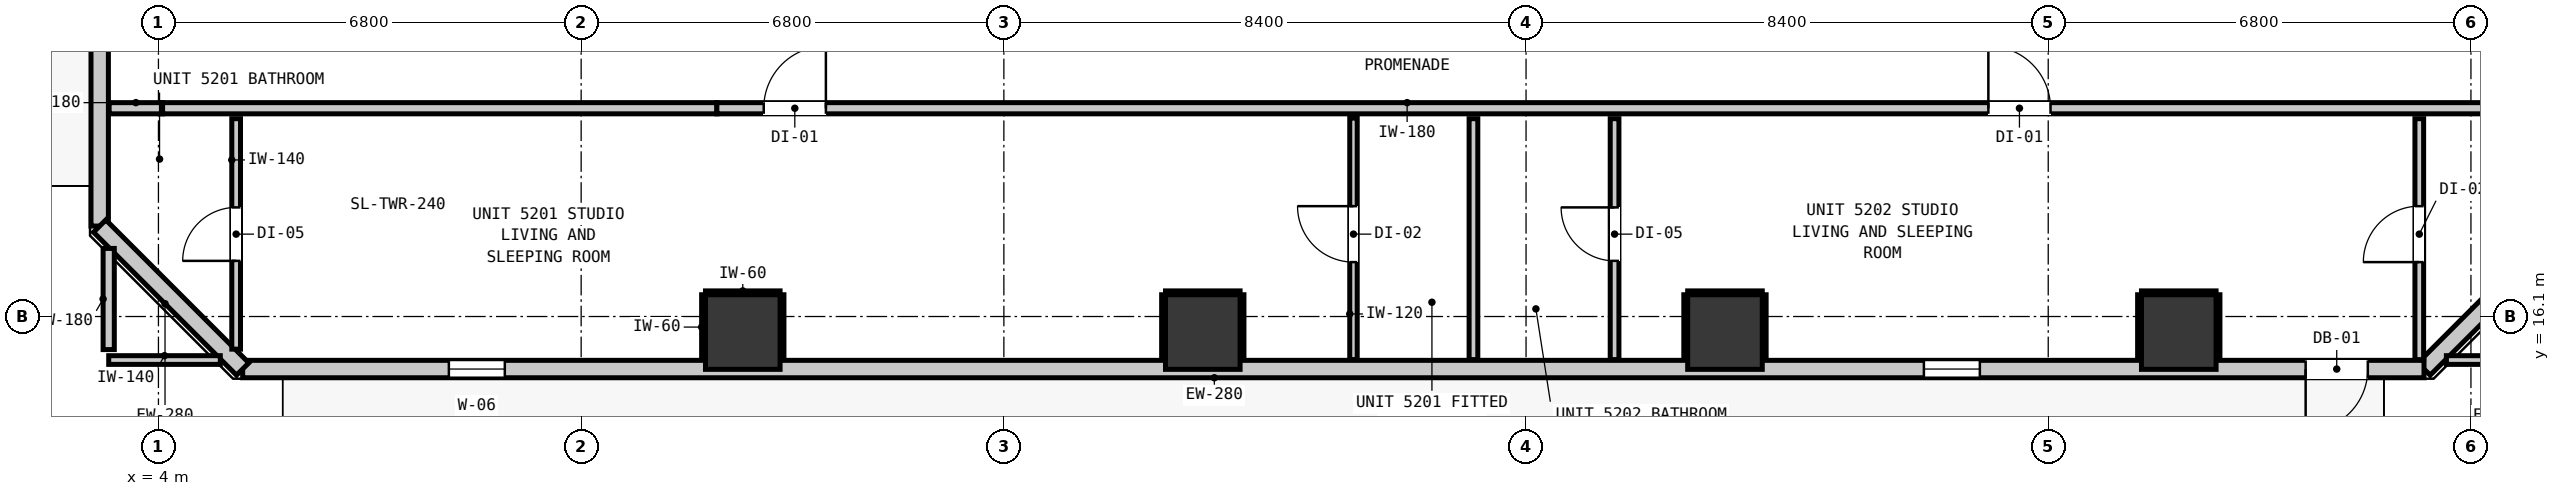
"""IFC4 building model, lengths in metres.
Left out: names, types, materials, properties, quantities, classifications, styles, units other than length and angle.
Written with IfcOpenShell. Run it as: python <this file> out.ifc"""

import sys

from ifc_helpers import new_model, si_unit, direction, frame, frame_2d, origin, origin_2d, place, context, subcontext, project, spatial, rectangle, extrude, element, fill, save


model = new_model("IFC4")
c1 = context("Model", 3, precision=1e-05, world=origin(), true_north=direction((0.0, 1.0)))
c2 = subcontext(c1, "Body", "Model", "MODEL_VIEW")
j1 = project(units=[si_unit("LENGTHUNIT", "METRE"), si_unit("PLANEANGLEUNIT", "RADIAN")], contexts=[c1])
p1 = place(None, origin())
s1 = spatial("IfcSite", under=j1, at=p1, CompositionType="ELEMENT")
p2 = place(p1, origin())
s2 = spatial("IfcBuilding", under=s1, at=p2, CompositionType="ELEMENT")
p3 = place(p2, frame((0.0, 0.0, 180.2)))
s3 = spatial("IfcBuildingStorey", under=s2, at=p3, CompositionType="ELEMENT", Elevation=180.2)
for number, where, z_axis, x_axis in (
    (1, (13.4, 15.85, 0.0), (0.0, 0.0, 1.0), (1.0, 0.0, 0.0)),
    (2, (20.8, 15.85, 0.0), (0.0, 0.0, 1.0), (1.0, 0.0, 0.0)),
    (3, (29.2, 15.85, 0.0), (0.0, 0.0, 1.0), (1.0, 0.0, 0.0)),
    (4, (36.5, 15.85, 0.0), (0.0, 0.0, 1.0), (1.0, 0.0, 0.0)),
):
    element("IfcColumn", number, at=place(p3, frame(where, z_axis=z_axis, x_axis=x_axis)), inside=s3, PredefinedType="COLUMN", context=c2, shape_type="SweptSolid", body=[
        extrude(rectangle(XDim=1.2, YDim=1.2, at=origin_2d()), origin(), (0.0, 0.0, 1.0), 3.32),
    ])
p4 = place(p3, frame((3.055, 17.555, 0.0), z_axis=(0.0, 0.0, 1.0), x_axis=(0.0, 1.0, 0.0)))
e5 = element("IfcWall", 5, at=p4, inside=s3, PredefinedType="STANDARD", context=c2, shape_type="SweptSolid", body=[
    extrude(rectangle(XDim=32.29, YDim=0.28, at=frame_2d((16.145, 0.0))), origin(), (0.0, 0.0, 1.0), 3.08),
])
p5 = place(p4, frame((8.625, 0.0, 0.0)))
e6 = element("IfcOpeningElement", 6, at=p5, cuts=e5, PredefinedType="OPENING", context=c2, shape_type="SweptSolid", body=[
    extrude(rectangle(XDim=1.0, YDim=2.15, at=frame_2d((0.5, 1.075))), frame((0.0, 0.15, 0.0), z_axis=(0.0, -1.0, 0.0), x_axis=(1.0, 0.0, 0.0)), (0.0, 0.0, 1.0), 0.3),
])
p6 = place(p4, frame((30.322, 0.0, 0.85)))
e7 = element("IfcOpeningElement", 7, at=p6, cuts=e5, PredefinedType="OPENING", context=c2, shape_type="SweptSolid", body=[
    extrude(rectangle(XDim=0.9, YDim=1.5, at=frame_2d((0.45, 0.75))), frame((0.0, 0.15, 0.0), z_axis=(0.0, -1.0, 0.0), x_axis=(1.0, 0.0, 0.0)), (0.0, 0.0, 1.0), 0.3),
])
p7 = place(p4, frame((10.785, 0.0, 0.85)))
e8 = element("IfcOpeningElement", 8, at=p7, cuts=e5, PredefinedType="OPENING", context=c2, shape_type="SweptSolid", body=[
    extrude(rectangle(XDim=0.9, YDim=1.5, at=frame_2d((0.45, 0.75))), frame((0.0, 0.15, 0.0), z_axis=(0.0, -1.0, 0.0), x_axis=(1.0, 0.0, 0.0)), (0.0, 0.0, 1.0), 0.3),
])
p8 = place(p4, frame((17.045, 0.0, 0.85)))
e9 = element("IfcOpeningElement", 9, at=p8, cuts=e5, PredefinedType="OPENING", context=c2, shape_type="SweptSolid", body=[
    extrude(rectangle(XDim=0.9, YDim=1.5, at=frame_2d((0.45, 0.75))), frame((0.0, 0.15, 0.0), z_axis=(0.0, -1.0, 0.0), x_axis=(1.0, 0.0, 0.0)), (0.0, 0.0, 1.0), 0.3),
])
p9 = place(p3, frame((42.745, 17.555, 0.0), z_axis=(0.0, 0.0, 1.0), x_axis=(-0.707106781187, -0.707106781187, 0.0)))
e10 = element("IfcWall", 10, at=p9, inside=s3, PredefinedType="STANDARD", context=c2, shape_type="SweptSolid", body=[
    extrude(rectangle(XDim=3.253, YDim=0.28, at=frame_2d((1.626, 0.0))), origin(), (0.0, 0.0, 1.0), 3.08),
])
p10 = place(p3, frame((40.445, 15.255, 0.0), z_axis=(0.0, 0.0, 1.0), x_axis=(-1.0, 0.0, 0.0)))
e11 = element("IfcWall", 11, at=p10, inside=s3, PredefinedType="STANDARD", context=c2, shape_type="SweptSolid", body=[
    extrude(rectangle(XDim=35.09, YDim=0.28, at=frame_2d((17.545, 0.0))), origin(), (0.0, 0.0, 1.0), 3.08),
])
p11 = place(p10, frame((0.904, 0.0, 0.0)))
e12 = element("IfcOpeningElement", 12, at=p11, cuts=e11, PredefinedType="OPENING", context=c2, shape_type="SweptSolid", body=[
    extrude(rectangle(XDim=1.0, YDim=2.15, at=frame_2d((0.5, 1.075))), frame((0.0, 0.15, 0.0), z_axis=(0.0, -1.0, 0.0), x_axis=(1.0, 0.0, 0.0)), (0.0, 0.0, 1.0), 0.3),
])
p12 = place(p10, frame((30.873, 0.0, 0.85)))
e13 = element("IfcOpeningElement", 13, at=p12, cuts=e11, PredefinedType="OPENING", context=c2, shape_type="SweptSolid", body=[
    extrude(rectangle(XDim=0.9, YDim=1.5, at=frame_2d((0.45, 0.75))), frame((0.0, 0.15, 0.0), z_axis=(0.0, -1.0, 0.0), x_axis=(1.0, 0.0, 0.0)), (0.0, 0.0, 1.0), 0.3),
])
p13 = place(p10, frame((7.145, 0.0, 0.85)))
e14 = element("IfcOpeningElement", 14, at=p13, cuts=e11, PredefinedType="OPENING", context=c2, shape_type="SweptSolid", body=[
    extrude(rectangle(XDim=0.9, YDim=1.5, at=frame_2d((0.45, 0.75))), frame((0.0, 0.15, 0.0), z_axis=(0.0, -1.0, 0.0), x_axis=(1.0, 0.0, 0.0)), (0.0, 0.0, 1.0), 0.3),
])
p14 = place(p3, frame((5.355, 15.255, 0.0), z_axis=(0.0, 0.0, 1.0), x_axis=(-0.707106781187, 0.707106781187, 0.0)))
e15 = element("IfcWall", 15, at=p14, inside=s3, PredefinedType="STANDARD", context=c2, shape_type="SweptSolid", body=[
    extrude(rectangle(XDim=3.253, YDim=0.28, at=frame_2d((1.626, 0.0))), origin(), (0.0, 0.0, 1.0), 3.08),
])
p15 = place(p3, frame((3.207, 19.45, 0.0), z_axis=(0.0, 0.0, 1.0), x_axis=(1.0, 0.0, 0.0)))
e16 = element("IfcWall", 16, at=p15, inside=s3, PredefinedType="PARTITIONING", context=c2, shape_type="SweptSolid", body=[
    extrude(rectangle(XDim=0.86, YDim=0.18, at=frame_2d((0.43, 0.0))), origin(), (0.0, 0.0, 1.0), 3.08),
])
p16 = place(p3, frame((4.067, 19.45, 0.0), z_axis=(0.0, 0.0, 1.0), x_axis=(1.0, 0.0, 0.0)))
e17 = element("IfcWall", 17, at=p16, inside=s3, PredefinedType="PARTITIONING", context=c2, shape_type="SweptSolid", body=[
    extrude(rectangle(XDim=8.916, YDim=0.18, at=frame_2d((4.458, 0.0))), origin(), (0.0, 0.0, 1.0), 2.565),
])
p17 = place(p3, frame((12.983, 19.45, 0.0), z_axis=(0.0, 0.0, 1.0), x_axis=(1.0, 0.0, 0.0)))
e18 = element("IfcWall", 18, at=p17, inside=s3, PredefinedType="PARTITIONING", context=c2, shape_type="SweptSolid", body=[
    extrude(rectangle(XDim=29.61, YDim=0.18, at=frame_2d((14.805, 0.0))), origin(), (0.0, 0.0, 1.0), 3.08),
])
p18 = place(p17, frame((0.754, 0.0, 0.0)))
e19 = element("IfcOpeningElement", 19, at=p18, cuts=e18, PredefinedType="OPENING", context=c2, shape_type="SweptSolid", body=[
    extrude(rectangle(XDim=1.0, YDim=2.15, at=frame_2d((0.5, 1.075))), frame((0.0, 0.1, 0.0), z_axis=(0.0, -1.0, 0.0), x_axis=(1.0, 0.0, 0.0)), (0.0, 0.0, 1.0), 0.2),
])
p19 = place(p17, frame((20.454, 0.0, 0.0)))
e20 = element("IfcOpeningElement", 20, at=p19, cuts=e18, PredefinedType="OPENING", context=c2, shape_type="SweptSolid", body=[
    extrude(rectangle(XDim=1.0, YDim=2.15, at=frame_2d((0.5, 1.075))), frame((0.0, 0.1, 0.0), z_axis=(0.0, -1.0, 0.0), x_axis=(1.0, 0.0, 0.0)), (0.0, 0.0, 1.0), 0.2),
])
for number, where, z_axis, x_axis in (
    (21, (3.2, 15.4, 0.0), (0.0, 0.0, 1.0), (1.0, 0.0, 0.0)),
    (22, (40.805, 15.4, 0.0), (0.0, 0.0, 1.0), (1.0, 0.0, 0.0)),
):
    element("IfcWall", number, at=place(p3, frame(where, z_axis=z_axis, x_axis=x_axis)), inside=s3, PredefinedType="PARTITIONING", context=c2, shape_type="SweptSolid", body=[
        extrude(rectangle(XDim=1.795, YDim=0.14, at=frame_2d((0.897, 0.0))), origin(), (0.0, 0.0, 1.0), 3.08),
    ])
p20 = place(p3, frame((3.2, 15.568, 0.0), z_axis=(0.0, 0.0, 1.0), x_axis=(0.0, 1.0, 0.0)))
e23 = element("IfcWall", 23, at=p20, inside=s3, PredefinedType="PARTITIONING", context=c2, shape_type="SweptSolid", body=[
    extrude(rectangle(XDim=1.627, YDim=0.18, at=frame_2d((0.813, 0.0))), origin(), (0.0, 0.0, 1.0), 3.08),
])
p21 = place(p3, frame((5.25, 15.575, 0.0), z_axis=(0.0, 0.0, 1.0), x_axis=(0.0, 1.0, 0.0)))
e24 = element("IfcWall", 24, at=p21, inside=s3, PredefinedType="PARTITIONING", context=c2, shape_type="SweptSolid", body=[
    extrude(rectangle(XDim=3.707, YDim=0.14, at=frame_2d((1.854, 0.0))), origin(), (0.0, 0.0, 1.0), 3.08),
])
p22 = place(p21, frame((1.42, 0.0, 0.0)))
e25 = element("IfcOpeningElement", 25, at=p22, cuts=e24, PredefinedType="OPENING", context=c2, shape_type="SweptSolid", body=[
    extrude(rectangle(XDim=0.86, YDim=2.02, at=frame_2d((0.43, 1.01))), frame((0.0, 0.08, 0.0), z_axis=(0.0, -1.0, 0.0), x_axis=(1.0, 0.0, 0.0)), (0.0, 0.0, 1.0), 0.16),
])
p23 = place(p3, frame((25.154, 15.407, 0.0), z_axis=(0.0, 0.0, 1.0), x_axis=(0.0, 1.0, 0.0)))
e26 = element("IfcWall", 26, at=p23, inside=s3, PredefinedType="PARTITIONING", context=c2, shape_type="SweptSolid", body=[
    extrude(rectangle(XDim=3.875, YDim=0.14, at=frame_2d((1.938, 0.0))), origin(), (0.0, 0.0, 1.0), 3.08),
])
p24 = place(p3, frame((27.424, 15.407, 0.0), z_axis=(0.0, 0.0, 1.0), x_axis=(0.0, 1.0, 0.0)))
e27 = element("IfcWall", 27, at=p24, inside=s3, PredefinedType="PARTITIONING", context=c2, shape_type="SweptSolid", body=[
    extrude(rectangle(XDim=3.875, YDim=0.14, at=frame_2d((1.938, 0.0))), origin(), (0.0, 0.0, 1.0), 3.08),
])
p25 = place(p24, frame((1.588, 0.0, 0.0)))
e28 = element("IfcOpeningElement", 28, at=p25, cuts=e27, PredefinedType="OPENING", context=c2, shape_type="SweptSolid", body=[
    extrude(rectangle(XDim=0.86, YDim=2.02, at=frame_2d((0.43, 1.01))), frame((0.0, 0.08, 0.0), z_axis=(0.0, -1.0, 0.0), x_axis=(1.0, 0.0, 0.0)), (0.0, 0.0, 1.0), 0.16),
])
p26 = place(p3, frame((40.369, 15.407, 0.0), z_axis=(0.0, 0.0, 1.0), x_axis=(0.0, 1.0, 0.0)))
e29 = element("IfcWall", 29, at=p26, inside=s3, PredefinedType="PARTITIONING", context=c2, shape_type="SweptSolid", body=[
    extrude(rectangle(XDim=3.875, YDim=0.14, at=frame_2d((1.938, 0.0))), origin(), (0.0, 0.0, 1.0), 3.08),
])
p27 = place(p26, frame((1.568, 0.0, 0.0)))
e30 = element("IfcOpeningElement", 30, at=p27, cuts=e29, PredefinedType="OPENING", context=c2, shape_type="SweptSolid", body=[
    extrude(rectangle(XDim=0.9, YDim=2.1, at=frame_2d((0.45, 1.05))), frame((0.0, 0.08, 0.0), z_axis=(0.0, -1.0, 0.0), x_axis=(1.0, 0.0, 0.0)), (0.0, 0.0, 1.0), 0.16),
])
p28 = place(p3, frame((23.224, 15.407, 0.0), z_axis=(0.0, 0.0, 1.0), x_axis=(0.0, 1.0, 0.0)))
e31 = element("IfcWall", 31, at=p28, inside=s3, PredefinedType="PARTITIONING", context=c2, shape_type="SweptSolid", body=[
    extrude(rectangle(XDim=3.885, YDim=0.12, at=frame_2d((1.942, 0.0))), origin(), (0.0, 0.0, 1.0), 3.08),
])
p29 = place(p28, frame((1.568, 0.0, 0.0)))
e32 = element("IfcOpeningElement", 32, at=p29, cuts=e31, PredefinedType="OPENING", context=c2, shape_type="SweptSolid", body=[
    extrude(rectangle(XDim=0.9, YDim=2.1, at=frame_2d((0.45, 1.05))), frame((0.0, 0.07, 0.0), z_axis=(0.0, -1.0, 0.0), x_axis=(1.0, 0.0, 0.0)), (0.0, 0.0, 1.0), 0.14),
])
p30 = place(p3, frame((12.8, 16.482, 0.0), z_axis=(0.0, 0.0, 1.0), x_axis=(1.0, 0.0, 0.0)))
e33 = element("IfcWall", 33, at=p30, inside=s3, PredefinedType="PARTITIONING", context=c2, shape_type="SweptSolid", body=[
    extrude(rectangle(XDim=1.2, YDim=0.06, at=frame_2d((0.6, 0.0))), origin(), (0.0, 0.0, 1.0), 1.45),
])
for number, where, z_axis, x_axis in (
    (34, (12.768, 15.41, 0.0), (0.0, 0.0, 1.0), (0.0, 1.0, 0.0)),
    (35, (14.032, 15.41, 0.0), (0.0, 0.0, 1.0), (0.0, 1.0, 0.0)),
):
    element("IfcWall", number, at=place(p3, frame(where, z_axis=z_axis, x_axis=x_axis)), inside=s3, PredefinedType="PARTITIONING", context=c2, shape_type="SweptSolid", body=[
        extrude(rectangle(XDim=1.04, YDim=0.06, at=frame_2d((0.52, 0.0))), origin(), (0.0, 0.0, 1.0), 1.45),
    ])
p31 = place(p3, frame((20.2, 16.482, 0.0), z_axis=(0.0, 0.0, 1.0), x_axis=(1.0, 0.0, 0.0)))
e36 = element("IfcWall", 36, at=p31, inside=s3, PredefinedType="PARTITIONING", context=c2, shape_type="SweptSolid", body=[
    extrude(rectangle(XDim=1.2, YDim=0.06, at=frame_2d((0.6, 0.0))), origin(), (0.0, 0.0, 1.0), 1.45),
])
for number, where, z_axis, x_axis in (
    (37, (20.168, 15.41, 0.0), (0.0, 0.0, 1.0), (0.0, 1.0, 0.0)),
    (38, (21.432, 15.41, 0.0), (0.0, 0.0, 1.0), (0.0, 1.0, 0.0)),
):
    element("IfcWall", number, at=place(p3, frame(where, z_axis=z_axis, x_axis=x_axis)), inside=s3, PredefinedType="PARTITIONING", context=c2, shape_type="SweptSolid", body=[
        extrude(rectangle(XDim=1.04, YDim=0.06, at=frame_2d((0.52, 0.0))), origin(), (0.0, 0.0, 1.0), 1.45),
    ])
p32 = place(p3, frame((28.6, 16.482, 0.0), z_axis=(0.0, 0.0, 1.0), x_axis=(1.0, 0.0, 0.0)))
e39 = element("IfcWall", 39, at=p32, inside=s3, PredefinedType="PARTITIONING", context=c2, shape_type="SweptSolid", body=[
    extrude(rectangle(XDim=1.2, YDim=0.06, at=frame_2d((0.6, 0.0))), origin(), (0.0, 0.0, 1.0), 1.45),
])
for number, where, z_axis, x_axis in (
    (40, (28.568, 15.41, 0.0), (0.0, 0.0, 1.0), (0.0, 1.0, 0.0)),
    (41, (29.832, 15.41, 0.0), (0.0, 0.0, 1.0), (0.0, 1.0, 0.0)),
):
    element("IfcWall", number, at=place(p3, frame(where, z_axis=z_axis, x_axis=x_axis)), inside=s3, PredefinedType="PARTITIONING", context=c2, shape_type="SweptSolid", body=[
        extrude(rectangle(XDim=1.04, YDim=0.06, at=frame_2d((0.52, 0.0))), origin(), (0.0, 0.0, 1.0), 1.45),
    ])
p33 = place(p3, frame((35.9, 16.482, 0.0), z_axis=(0.0, 0.0, 1.0), x_axis=(1.0, 0.0, 0.0)))
e42 = element("IfcWall", 42, at=p33, inside=s3, PredefinedType="PARTITIONING", context=c2, shape_type="SweptSolid", body=[
    extrude(rectangle(XDim=1.2, YDim=0.06, at=frame_2d((0.6, 0.0))), origin(), (0.0, 0.0, 1.0), 1.45),
])
for number, where, z_axis, x_axis in (
    (43, (35.868, 15.41, 0.0), (0.0, 0.0, 1.0), (0.0, 1.0, 0.0)),
    (44, (37.132, 15.41, 0.0), (0.0, 0.0, 1.0), (0.0, 1.0, 0.0)),
):
    element("IfcWall", number, at=place(p3, frame(where, z_axis=z_axis, x_axis=x_axis)), inside=s3, PredefinedType="PARTITIONING", context=c2, shape_type="SweptSolid", body=[
        extrude(rectangle(XDim=1.04, YDim=0.06, at=frame_2d((0.52, 0.0))), origin(), (0.0, 0.0, 1.0), 1.45),
    ])
p34 = place(p11, origin())
e45 = element("IfcDoor", 45, at=p34, inside=s3, OperationType="SINGLE_SWING_RIGHT", PredefinedType="DOOR", context=c2, shape_type="SweptSolid", body=[
    extrude(rectangle(XDim=1.0, YDim=2.15, at=frame_2d((0.5, 1.075))), frame((0.0, 0.025, 0.0), z_axis=(0.0, -1.0, 0.0), x_axis=(1.0, 0.0, 0.0)), (0.0, 0.0, 1.0), 0.05),
])
fill(e12, e45)
p35 = place(p12, origin())
e46 = element("IfcWindow", 46, at=p35, inside=s3, PartitioningType="SINGLE_PANEL", PredefinedType="WINDOW", context=c2, shape_type="SweptSolid", body=[
    extrude(rectangle(XDim=0.9, YDim=1.5, at=frame_2d((0.45, 0.75))), frame((0.0, 0.03, 0.0), z_axis=(0.0, -1.0, 0.0), x_axis=(1.0, 0.0, 0.0)), (0.0, 0.0, 1.0), 0.06),
])
fill(e13, e46)
p36 = place(p13, origin())
e47 = element("IfcWindow", 47, at=p36, inside=s3, PartitioningType="SINGLE_PANEL", PredefinedType="WINDOW", context=c2, shape_type="SweptSolid", body=[
    extrude(rectangle(XDim=0.9, YDim=1.5, at=frame_2d((0.45, 0.75))), frame((0.0, 0.03, 0.0), z_axis=(0.0, -1.0, 0.0), x_axis=(1.0, 0.0, 0.0)), (0.0, 0.0, 1.0), 0.06),
])
fill(e14, e47)
p37 = place(p18, origin())
e48 = element("IfcDoor", 48, at=p37, inside=s3, OperationType="SINGLE_SWING_RIGHT", PredefinedType="DOOR", context=c2, shape_type="SweptSolid", body=[
    extrude(rectangle(XDim=1.0, YDim=2.15, at=frame_2d((0.5, 1.075))), frame((0.0, 0.025, 0.0), z_axis=(0.0, -1.0, 0.0), x_axis=(1.0, 0.0, 0.0)), (0.0, 0.0, 1.0), 0.05),
])
fill(e19, e48)
p38 = place(p22, origin())
e49 = element("IfcDoor", 49, at=p38, inside=s3, OperationType="SINGLE_SWING_LEFT", PredefinedType="DOOR", context=c2, shape_type="SweptSolid", body=[
    extrude(rectangle(XDim=0.86, YDim=2.02, at=frame_2d((0.43, 1.01))), frame((0.0, 0.025, 0.0), z_axis=(0.0, -1.0, 0.0), x_axis=(1.0, 0.0, 0.0)), (0.0, 0.0, 1.0), 0.05),
])
fill(e25, e49)
p39 = place(p29, origin())
e50 = element("IfcDoor", 50, at=p39, inside=s3, OperationType="SINGLE_SWING_RIGHT", PredefinedType="DOOR", context=c2, shape_type="SweptSolid", body=[
    extrude(rectangle(XDim=0.9, YDim=2.1, at=frame_2d((0.45, 1.05))), frame((0.0, 0.025, 0.0), z_axis=(0.0, -1.0, 0.0), x_axis=(1.0, 0.0, 0.0)), (0.0, 0.0, 1.0), 0.05),
])
fill(e32, e50)
p40 = place(p19, origin())
e51 = element("IfcDoor", 51, at=p40, inside=s3, OperationType="SINGLE_SWING_LEFT", PredefinedType="DOOR", context=c2, shape_type="SweptSolid", body=[
    extrude(rectangle(XDim=1.0, YDim=2.15, at=frame_2d((0.5, 1.075))), frame((0.0, 0.025, 0.0), z_axis=(0.0, -1.0, 0.0), x_axis=(1.0, 0.0, 0.0)), (0.0, 0.0, 1.0), 0.05),
])
fill(e20, e51)
p41 = place(p25, origin())
e52 = element("IfcDoor", 52, at=p41, inside=s3, OperationType="SINGLE_SWING_RIGHT", PredefinedType="DOOR", context=c2, shape_type="SweptSolid", body=[
    extrude(rectangle(XDim=0.86, YDim=2.02, at=frame_2d((0.43, 1.01))), frame((0.0, 0.025, 0.0), z_axis=(0.0, -1.0, 0.0), x_axis=(1.0, 0.0, 0.0)), (0.0, 0.0, 1.0), 0.05),
])
fill(e28, e52)
p42 = place(p27, origin())
e53 = element("IfcDoor", 53, at=p42, inside=s3, OperationType="SINGLE_SWING_LEFT", PredefinedType="DOOR", context=c2, shape_type="SweptSolid", body=[
    extrude(rectangle(XDim=0.9, YDim=2.1, at=frame_2d((0.45, 1.05))), frame((0.0, 0.025, 0.0), z_axis=(0.0, -1.0, 0.0), x_axis=(1.0, 0.0, 0.0)), (0.0, 0.0, 1.0), 0.05),
])
fill(e30, e53)
save(model, sys.argv[1])
